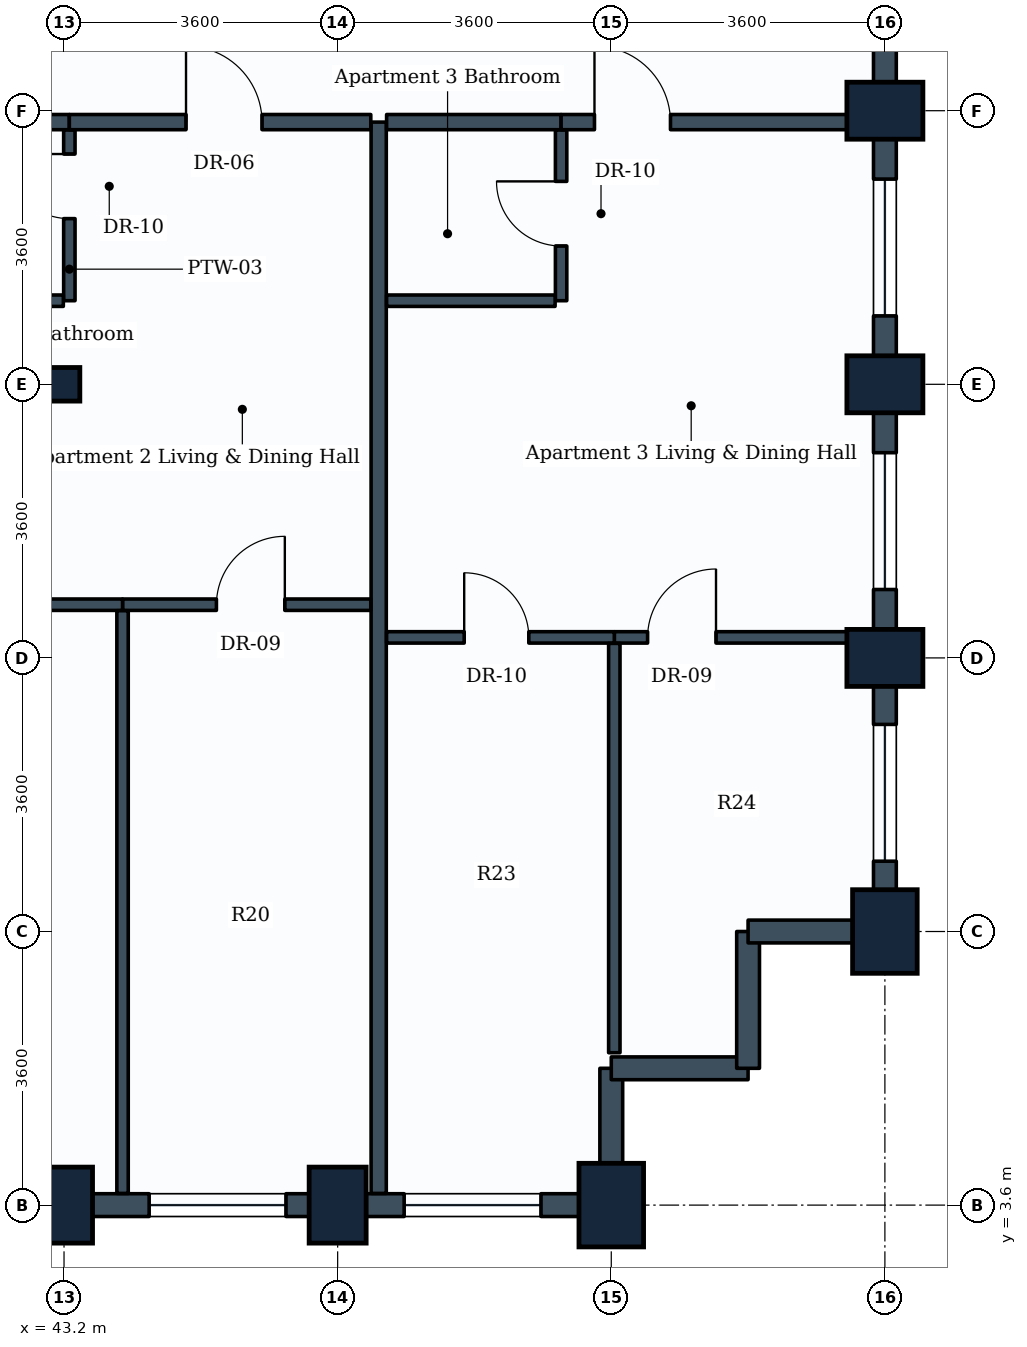
"""IFC4 building model, lengths in metres.
Left out: names, types, materials, properties, quantities, classifications, styles, units other than length and angle.
Written with IfcOpenShell. Run it as: python <this file> out.ifc"""

import sys

from ifc_helpers import new_model, si_unit, direction, frame, frame_2d, origin, origin_2d, place, context, subcontext, project, spatial, rectangle, i_section, extrude, element, fill, save


model = new_model("IFC4")
c1 = context("Model", 3, precision=1e-05, world=origin(), true_north=direction((0.0, 1.0)))
c2 = subcontext(c1, "Body", "Model", "MODEL_VIEW")
j1 = project(units=[si_unit("LENGTHUNIT", "METRE"), si_unit("PLANEANGLEUNIT", "RADIAN")], contexts=[c1])
p1 = place(None, origin())
s1 = spatial("IfcSite", under=j1, at=p1, CompositionType="ELEMENT")
p2 = place(p1, origin())
s2 = spatial("IfcBuilding", under=s1, at=p2, CompositionType="ELEMENT")
p3 = place(p2, frame((0.0, 0.0, 142.8)))
s3 = spatial("IfcBuildingStorey", under=s2, at=p3, CompositionType="ELEMENT", Elevation=142.8)
p4 = place(p3, frame((43.2, 3.6, 0.0), z_axis=(0.0, 0.0, 1.0), x_axis=(1.0, 0.0, 0.0)))
e1 = element("IfcColumn", 1, at=p4, inside=s3, PredefinedType="COLUMN", context=c2, shape_type="SweptSolid", body=[
    extrude(rectangle(XDim=0.75, YDim=1.0, at=origin_2d()), origin(), (0.0, 0.0, 1.0), 3.8),
])
p5 = place(p3, frame((43.2, 14.4, 0.0), z_axis=(0.0, 0.0, 1.0), x_axis=(1.0, 0.0, 0.0)))
e2 = element("IfcColumn", 2, at=p5, inside=s3, PredefinedType="COLUMN", context=c2, shape_type="SweptSolid", body=[
    extrude(i_section(OverallWidth=0.416, OverallDepth=0.442, WebThickness=0.025, FlangeThickness=0.041, FilletRadius=0.015, at=origin_2d()), origin(), (0.0, 0.0, 1.0), 3.8),
])
p6 = place(p3, frame((46.8, 3.6, 0.0), z_axis=(0.0, 0.0, 1.0), x_axis=(1.0, 0.0, 0.0)))
e3 = element("IfcColumn", 3, at=p6, inside=s3, PredefinedType="COLUMN", context=c2, shape_type="SweptSolid", body=[
    extrude(rectangle(XDim=0.75, YDim=1.0, at=origin_2d()), origin(), (0.0, 0.0, 1.0), 3.8),
])
for number, where, z_axis, x_axis in (
    (4, (50.4, 3.6, 0.0), (0.0, 0.0, 1.0), (1.0, 0.0, 0.0)),
    (5, (54.0, 7.2, 0.0), (0.0, 0.0, 1.0), (1.0, 0.0, 0.0)),
):
    element("IfcColumn", number, at=place(p3, frame(where, z_axis=z_axis, x_axis=x_axis)), inside=s3, PredefinedType="COLUMN", context=c2, shape_type="SweptSolid", body=[
        extrude(rectangle(XDim=0.85, YDim=1.1, at=origin_2d()), origin(), (0.0, 0.0, 1.0), 3.8),
    ])
for number, where, z_axis, x_axis in (
    (6, (54.0, 10.8, 0.0), (0.0, 0.0, 1.0), (0.0, 1.0, 0.0)),
    (7, (54.0, 14.4, 0.0), (0.0, 0.0, 1.0), (0.0, 1.0, 0.0)),
    (8, (54.0, 18.0, 0.0), (0.0, 0.0, 1.0), (0.0, 1.0, 0.0)),
):
    element("IfcColumn", number, at=place(p3, frame(where, z_axis=z_axis, x_axis=x_axis)), inside=s3, PredefinedType="COLUMN", context=c2, shape_type="SweptSolid", body=[
        extrude(rectangle(XDim=0.75, YDim=1.0, at=origin_2d()), origin(), (0.0, 0.0, 1.0), 3.8),
    ])
p7 = place(p3, frame((43.2, 3.6, 0.0), z_axis=(0.0, 0.0, 1.0), x_axis=(-1.0, 0.0, 0.0)))
e9 = element("IfcWall", 9, at=p7, inside=s3, PredefinedType="STANDARD", context=c2, shape_type="SweptSolid", body=[
    extrude(rectangle(XDim=3.6, YDim=0.3, at=frame_2d((1.8, 0.0))), origin(), (0.0, 0.0, 1.0), 2.93),
])
p8 = place(p3, frame((46.8, 3.6, 0.0), z_axis=(0.0, 0.0, 1.0), x_axis=(-1.0, 0.0, 0.0)))
e10 = element("IfcWall", 10, at=p8, inside=s3, PredefinedType="STANDARD", context=c2, shape_type="SweptSolid", body=[
    extrude(rectangle(XDim=3.6, YDim=0.3, at=frame_2d((1.8, 0.0))), origin(), (0.0, 0.0, 1.0), 2.93),
])
p9 = place(p8, frame((0.68, 0.0, 0.85)))
e11 = element("IfcOpeningElement", 11, at=p9, cuts=e10, PredefinedType="OPENING", context=c2, shape_type="SweptSolid", body=[
    extrude(rectangle(XDim=1.8, YDim=1.35, at=frame_2d((0.9, 0.675))), frame((0.0, 0.16, 0.0), z_axis=(0.0, -1.0, 0.0), x_axis=(1.0, 0.0, 0.0)), (0.0, 0.0, 1.0), 0.32),
])
p10 = place(p3, frame((50.4, 3.6, 0.0), z_axis=(0.0, 0.0, 1.0), x_axis=(-1.0, 0.0, 0.0)))
e12 = element("IfcWall", 12, at=p10, inside=s3, PredefinedType="STANDARD", context=c2, shape_type="SweptSolid", body=[
    extrude(rectangle(XDim=3.6, YDim=0.3, at=frame_2d((1.8, 0.0))), origin(), (0.0, 0.0, 1.0), 2.93),
])
p11 = place(p10, frame((0.925, 0.0, 0.85)))
e13 = element("IfcOpeningElement", 13, at=p11, cuts=e12, PredefinedType="OPENING", context=c2, shape_type="SweptSolid", body=[
    extrude(rectangle(XDim=1.8, YDim=1.35, at=frame_2d((0.9, 0.675))), frame((0.0, 0.16, 0.0), z_axis=(0.0, -1.0, 0.0), x_axis=(1.0, 0.0, 0.0)), (0.0, 0.0, 1.0), 0.32),
])
p12 = place(p3, frame((50.4, 5.4, 0.0), z_axis=(0.0, 0.0, 1.0), x_axis=(0.0, -1.0, 0.0)))
e14 = element("IfcWall", 14, at=p12, inside=s3, PredefinedType="STANDARD", context=c2, shape_type="SweptSolid", body=[
    extrude(rectangle(XDim=1.8, YDim=0.3, at=frame_2d((0.9, 0.0))), origin(), (0.0, 0.0, 1.0), 2.93),
])
for number, where, z_axis, x_axis in (
    (15, (52.2, 5.4, 0.0), (0.0, 0.0, 1.0), (-1.0, 0.0, 0.0)),
    (16, (52.2, 7.2, 0.0), (0.0, 0.0, 1.0), (0.0, -1.0, 0.0)),
):
    element("IfcWall", number, at=place(p3, frame(where, z_axis=z_axis, x_axis=x_axis)), inside=s3, PredefinedType="STANDARD", context=c2, shape_type="SweptSolid", body=[
        extrude(rectangle(XDim=1.8, YDim=0.3, at=frame_2d((0.9, 0.0))), origin(), (0.0, 0.0, 1.0), 3.535),
    ])
p13 = place(p3, frame((54.0, 7.2, 0.0), z_axis=(0.0, 0.0, 1.0), x_axis=(-1.0, 0.0, 0.0)))
e17 = element("IfcWall", 17, at=p13, inside=s3, PredefinedType="STANDARD", context=c2, shape_type="SweptSolid", body=[
    extrude(rectangle(XDim=1.8, YDim=0.3, at=frame_2d((0.9, 0.0))), origin(), (0.0, 0.0, 1.0), 2.93),
])
p14 = place(p3, frame((54.0, 10.8, 0.0), z_axis=(0.0, 0.0, 1.0), x_axis=(0.0, -1.0, 0.0)))
e18 = element("IfcWall", 18, at=p14, inside=s3, PredefinedType="STANDARD", context=c2, shape_type="SweptSolid", body=[
    extrude(rectangle(XDim=3.6, YDim=0.3, at=frame_2d((1.8, 0.0))), origin(), (0.0, 0.0, 1.0), 2.93),
])
p15 = place(p14, frame((0.875, 0.0, 0.85)))
e19 = element("IfcOpeningElement", 19, at=p15, cuts=e18, PredefinedType="OPENING", context=c2, shape_type="SweptSolid", body=[
    extrude(rectangle(XDim=1.8, YDim=1.35, at=frame_2d((0.9, 0.675))), frame((0.0, 0.16, 0.0), z_axis=(0.0, -1.0, 0.0), x_axis=(1.0, 0.0, 0.0)), (0.0, 0.0, 1.0), 0.32),
])
p16 = place(p3, frame((54.0, 14.4, 0.0), z_axis=(0.0, 0.0, 1.0), x_axis=(0.0, -1.0, 0.0)))
e20 = element("IfcWall", 20, at=p16, inside=s3, PredefinedType="STANDARD", context=c2, shape_type="SweptSolid", body=[
    extrude(rectangle(XDim=3.6, YDim=0.3, at=frame_2d((1.8, 0.0))), origin(), (0.0, 0.0, 1.0), 2.93),
])
p17 = place(p16, frame((0.9, 0.0, 0.85)))
e21 = element("IfcOpeningElement", 21, at=p17, cuts=e20, PredefinedType="OPENING", context=c2, shape_type="SweptSolid", body=[
    extrude(rectangle(XDim=1.8, YDim=1.35, at=frame_2d((0.9, 0.675))), frame((0.0, 0.16, 0.0), z_axis=(0.0, -1.0, 0.0), x_axis=(1.0, 0.0, 0.0)), (0.0, 0.0, 1.0), 0.32),
])
p18 = place(p3, frame((54.0, 18.0, 0.0), z_axis=(0.0, 0.0, 1.0), x_axis=(0.0, -1.0, 0.0)))
e22 = element("IfcWall", 22, at=p18, inside=s3, PredefinedType="STANDARD", context=c2, shape_type="SweptSolid", body=[
    extrude(rectangle(XDim=3.6, YDim=0.3, at=frame_2d((1.8, 0.0))), origin(), (0.0, 0.0, 1.0), 2.93),
])
p19 = place(p18, frame((0.9, 0.0, 0.85)))
e23 = element("IfcOpeningElement", 23, at=p19, cuts=e22, PredefinedType="OPENING", context=c2, shape_type="SweptSolid", body=[
    extrude(rectangle(XDim=1.8, YDim=1.35, at=frame_2d((0.9, 0.675))), frame((0.0, 0.16, 0.0), z_axis=(0.0, -1.0, 0.0), x_axis=(1.0, 0.0, 0.0)), (0.0, 0.0, 1.0), 0.32),
])
p20 = place(p3, frame((54.0, 21.6, 0.0), z_axis=(0.0, 0.0, 1.0), x_axis=(0.0, -1.0, 0.0)))
e24 = element("IfcWall", 24, at=p20, inside=s3, PredefinedType="STANDARD", context=c2, shape_type="SweptSolid", body=[
    extrude(rectangle(XDim=3.6, YDim=0.3, at=frame_2d((1.8, 0.0))), origin(), (0.0, 0.0, 1.0), 2.93),
])
p21 = place(p3, frame((47.34, 3.754, 0.0), z_axis=(0.0, 0.0, 1.0), x_axis=(0.0, 1.0, 0.0)))
e25 = element("IfcWall", 25, at=p21, inside=s3, PredefinedType="PARTITIONING", context=c2, shape_type="SweptSolid", body=[
    extrude(rectangle(XDim=14.096, YDim=0.2, at=frame_2d((7.048, 0.0))), origin(), (0.0, 0.0, 1.0), 2.93),
])
p22 = place(p3, frame((40.974, 17.85, 0.0), z_axis=(0.0, 0.0, 1.0), x_axis=(1.0, 0.0, 0.0)))
e26 = element("IfcWall", 26, at=p22, inside=s3, PredefinedType="PARTITIONING", context=c2, shape_type="SweptSolid", body=[
    extrude(rectangle(XDim=2.296, YDim=0.2, at=frame_2d((1.148, 0.0))), origin(), (0.0, 0.0, 1.0), 3.13),
])
p23 = place(p3, frame((43.27, 15.5, 0.0), z_axis=(0.0, 0.0, 1.0), x_axis=(0.0, 1.0, 0.0)))
e27 = element("IfcWall", 27, at=p23, inside=s3, PredefinedType="PARTITIONING", context=c2, shape_type="SweptSolid", body=[
    extrude(rectangle(XDim=2.246, YDim=0.15, at=frame_2d((1.123, 0.0))), origin(), (0.0, 0.0, 1.0), 3.18),
])
p24 = place(p23, frame((1.08, 0.0, 0.0)))
e28 = element("IfcOpeningElement", 28, at=p24, cuts=e27, PredefinedType="OPENING", context=c2, shape_type="SweptSolid", body=[
    extrude(rectangle(XDim=0.85, YDim=2.1, at=frame_2d((0.425, 1.05))), frame((0.0, 0.085, 0.0), z_axis=(0.0, -1.0, 0.0), x_axis=(1.0, 0.0, 0.0)), (0.0, 0.0, 1.0), 0.17),
])
p25 = place(p3, frame((40.974, 15.5, 0.0), z_axis=(0.0, 0.0, 1.0), x_axis=(1.0, 0.0, 0.0)))
e29 = element("IfcWall", 29, at=p25, inside=s3, PredefinedType="PARTITIONING", context=c2, shape_type="SweptSolid", body=[
    extrude(rectangle(XDim=2.217, YDim=0.15, at=frame_2d((1.108, 0.0))), origin(), (0.0, 0.0, 1.0), 3.18),
])
p26 = place(p3, frame((43.27, 17.85, 0.0), z_axis=(0.0, 0.0, 1.0), x_axis=(1.0, 0.0, 0.0)))
e30 = element("IfcWall", 30, at=p26, inside=s3, PredefinedType="PARTITIONING", context=c2, shape_type="SweptSolid", body=[
    extrude(rectangle(XDim=3.966, YDim=0.2, at=frame_2d((1.983, 0.0))), origin(), (0.0, 0.0, 1.0), 3.17),
])
p27 = place(p26, frame((1.535, 0.0, 0.0)))
e31 = element("IfcOpeningElement", 31, at=p27, cuts=e30, PredefinedType="OPENING", context=c2, shape_type="SweptSolid", body=[
    extrude(rectangle(XDim=1.0, YDim=2.1, at=frame_2d((0.5, 1.05))), frame((0.0, 0.11, 0.0), z_axis=(0.0, -1.0, 0.0), x_axis=(1.0, 0.0, 0.0)), (0.0, 0.0, 1.0), 0.22),
])
p28 = place(p3, frame((43.97, 11.5, 0.0), z_axis=(0.0, 0.0, 1.0), x_axis=(1.0, 0.0, 0.0)))
e32 = element("IfcWall", 32, at=p28, inside=s3, PredefinedType="PARTITIONING", context=c2, shape_type="SweptSolid", body=[
    extrude(rectangle(XDim=3.266, YDim=0.15, at=frame_2d((1.633, 0.0))), origin(), (0.0, 0.0, 1.0), 3.17),
])
p29 = place(p28, frame((1.235, 0.0, 0.0)))
e33 = element("IfcOpeningElement", 33, at=p29, cuts=e32, PredefinedType="OPENING", context=c2, shape_type="SweptSolid", body=[
    extrude(rectangle(XDim=0.9, YDim=2.1, at=frame_2d((0.45, 1.05))), frame((0.0, 0.085, 0.0), z_axis=(0.0, -1.0, 0.0), x_axis=(1.0, 0.0, 0.0)), (0.0, 0.0, 1.0), 0.17),
])
p30 = place(p3, frame((40.974, 11.5, 0.0), z_axis=(0.0, 0.0, 1.0), x_axis=(1.0, 0.0, 0.0)))
e34 = element("IfcWall", 34, at=p30, inside=s3, PredefinedType="PARTITIONING", context=c2, shape_type="SweptSolid", body=[
    extrude(rectangle(XDim=2.996, YDim=0.15, at=frame_2d((1.498, 0.0))), origin(), (0.0, 0.0, 1.0), 3.18),
])
p31 = place(p30, frame((0.333, 0.0, 0.0)))
e35 = element("IfcOpeningElement", 35, at=p31, cuts=e34, PredefinedType="OPENING", context=c2, shape_type="SweptSolid", body=[
    extrude(rectangle(XDim=0.85, YDim=2.1, at=frame_2d((0.425, 1.05))), frame((0.0, 0.085, 0.0), z_axis=(0.0, -1.0, 0.0), x_axis=(1.0, 0.0, 0.0)), (0.0, 0.0, 1.0), 0.17),
])
p32 = place(p3, frame((43.97, 3.754, 0.0), z_axis=(0.0, 0.0, 1.0), x_axis=(0.0, 1.0, 0.0)))
e36 = element("IfcWall", 36, at=p32, inside=s3, PredefinedType="PARTITIONING", context=c2, shape_type="SweptSolid", body=[
    extrude(rectangle(XDim=7.667, YDim=0.15, at=frame_2d((3.833, 0.0))), origin(), (0.0, 0.0, 1.0), 2.93),
])
p33 = place(p3, frame((47.444, 17.85, 0.0), z_axis=(0.0, 0.0, 1.0), x_axis=(1.0, 0.0, 0.0)))
e37 = element("IfcWall", 37, at=p33, inside=s3, PredefinedType="PARTITIONING", context=c2, shape_type="SweptSolid", body=[
    extrude(rectangle(XDim=2.296, YDim=0.2, at=frame_2d((1.148, 0.0))), origin(), (0.0, 0.0, 1.0), 3.535),
])
p34 = place(p3, frame((49.74, 15.5, 0.0), z_axis=(0.0, 0.0, 1.0), x_axis=(0.0, 1.0, 0.0)))
e38 = element("IfcWall", 38, at=p34, inside=s3, PredefinedType="PARTITIONING", context=c2, shape_type="SweptSolid", body=[
    extrude(rectangle(XDim=2.246, YDim=0.15, at=frame_2d((1.123, 0.0))), origin(), (0.0, 0.0, 1.0), 3.535),
])
p35 = place(p34, frame((0.72, 0.0, 0.0)))
e39 = element("IfcOpeningElement", 39, at=p35, cuts=e38, PredefinedType="OPENING", context=c2, shape_type="SweptSolid", body=[
    extrude(rectangle(XDim=0.85, YDim=2.1, at=frame_2d((0.425, 1.05))), frame((0.0, 0.085, 0.0), z_axis=(0.0, -1.0, 0.0), x_axis=(1.0, 0.0, 0.0)), (0.0, 0.0, 1.0), 0.17),
])
p36 = place(p3, frame((47.444, 15.5, 0.0), z_axis=(0.0, 0.0, 1.0), x_axis=(1.0, 0.0, 0.0)))
e40 = element("IfcWall", 40, at=p36, inside=s3, PredefinedType="PARTITIONING", context=c2, shape_type="SweptSolid", body=[
    extrude(rectangle(XDim=2.217, YDim=0.15, at=frame_2d((1.108, 0.0))), origin(), (0.0, 0.0, 1.0), 3.535),
])
p37 = place(p3, frame((49.74, 17.85, 0.0), z_axis=(0.0, 0.0, 1.0), x_axis=(1.0, 0.0, 0.0)))
e41 = element("IfcWall", 41, at=p37, inside=s3, PredefinedType="PARTITIONING", context=c2, shape_type="SweptSolid", body=[
    extrude(rectangle(XDim=4.106, YDim=0.2, at=frame_2d((2.053, 0.0))), origin(), (0.0, 0.0, 1.0), 2.93),
])
p38 = place(p37, frame((0.439, 0.0, 0.0)))
e42 = element("IfcOpeningElement", 42, at=p38, cuts=e41, PredefinedType="OPENING", context=c2, shape_type="SweptSolid", body=[
    extrude(rectangle(XDim=1.0, YDim=2.1, at=frame_2d((0.5, 1.05))), frame((0.0, 0.11, 0.0), z_axis=(0.0, -1.0, 0.0), x_axis=(1.0, 0.0, 0.0)), (0.0, 0.0, 1.0), 0.22),
])
p39 = place(p3, frame((50.44, 11.07, 0.0), z_axis=(0.0, 0.0, 1.0), x_axis=(1.0, 0.0, 0.0)))
e43 = element("IfcWall", 43, at=p39, inside=s3, PredefinedType="PARTITIONING", context=c2, shape_type="SweptSolid", body=[
    extrude(rectangle(XDim=3.406, YDim=0.15, at=frame_2d((1.703, 0.0))), origin(), (0.0, 0.0, 1.0), 2.93),
])
p40 = place(p39, frame((0.438, 0.0, 0.0)))
e44 = element("IfcOpeningElement", 44, at=p40, cuts=e43, PredefinedType="OPENING", context=c2, shape_type="SweptSolid", body=[
    extrude(rectangle(XDim=0.9, YDim=2.1, at=frame_2d((0.45, 1.05))), frame((0.0, 0.085, 0.0), z_axis=(0.0, -1.0, 0.0), x_axis=(1.0, 0.0, 0.0)), (0.0, 0.0, 1.0), 0.17),
])
p41 = place(p3, frame((47.444, 11.07, 0.0), z_axis=(0.0, 0.0, 1.0), x_axis=(1.0, 0.0, 0.0)))
e45 = element("IfcWall", 45, at=p41, inside=s3, PredefinedType="PARTITIONING", context=c2, shape_type="SweptSolid", body=[
    extrude(rectangle(XDim=2.996, YDim=0.15, at=frame_2d((1.498, 0.0))), origin(), (0.0, 0.0, 1.0), 3.535),
])
p42 = place(p41, frame((1.021, 0.0, 0.0)))
e46 = element("IfcOpeningElement", 46, at=p42, cuts=e45, PredefinedType="OPENING", context=c2, shape_type="SweptSolid", body=[
    extrude(rectangle(XDim=0.85, YDim=2.1, at=frame_2d((0.425, 1.05))), frame((0.0, 0.085, 0.0), z_axis=(0.0, -1.0, 0.0), x_axis=(1.0, 0.0, 0.0)), (0.0, 0.0, 1.0), 0.17),
])
p43 = place(p3, frame((50.44, 5.605, 0.0), z_axis=(0.0, 0.0, 1.0), x_axis=(0.0, 1.0, 0.0)))
e47 = element("IfcWall", 47, at=p43, inside=s3, PredefinedType="PARTITIONING", context=c2, shape_type="SweptSolid", body=[
    extrude(rectangle(XDim=5.386, YDim=0.15, at=frame_2d((2.693, 0.0))), origin(), (0.0, 0.0, 1.0), 3.535),
])
p44 = place(p9, origin())
e48 = element("IfcWindow", 48, at=p44, inside=s3, PartitioningType="SINGLE_PANEL", PredefinedType="WINDOW", context=c2, shape_type="SweptSolid", body=[
    extrude(rectangle(XDim=1.8, YDim=1.35, at=frame_2d((0.9, 0.675))), frame((0.0, 0.03, 0.0), z_axis=(0.0, -1.0, 0.0), x_axis=(1.0, 0.0, 0.0)), (0.0, 0.0, 1.0), 0.06),
])
fill(e11, e48)
p45 = place(p11, origin())
e49 = element("IfcWindow", 49, at=p45, inside=s3, PartitioningType="SINGLE_PANEL", PredefinedType="WINDOW", context=c2, shape_type="SweptSolid", body=[
    extrude(rectangle(XDim=1.8, YDim=1.35, at=frame_2d((0.9, 0.675))), frame((0.0, 0.03, 0.0), z_axis=(0.0, -1.0, 0.0), x_axis=(1.0, 0.0, 0.0)), (0.0, 0.0, 1.0), 0.06),
])
fill(e13, e49)
p46 = place(p15, origin())
e50 = element("IfcWindow", 50, at=p46, inside=s3, PartitioningType="SINGLE_PANEL", PredefinedType="WINDOW", context=c2, shape_type="SweptSolid", body=[
    extrude(rectangle(XDim=1.8, YDim=1.35, at=frame_2d((0.9, 0.675))), frame((0.0, 0.03, 0.0), z_axis=(0.0, -1.0, 0.0), x_axis=(1.0, 0.0, 0.0)), (0.0, 0.0, 1.0), 0.06),
])
fill(e19, e50)
p47 = place(p17, origin())
e51 = element("IfcWindow", 51, at=p47, inside=s3, PartitioningType="SINGLE_PANEL", PredefinedType="WINDOW", context=c2, shape_type="SweptSolid", body=[
    extrude(rectangle(XDim=1.8, YDim=1.35, at=frame_2d((0.9, 0.675))), frame((0.0, 0.03, 0.0), z_axis=(0.0, -1.0, 0.0), x_axis=(1.0, 0.0, 0.0)), (0.0, 0.0, 1.0), 0.06),
])
fill(e21, e51)
p48 = place(p19, origin())
e52 = element("IfcWindow", 52, at=p48, inside=s3, PartitioningType="SINGLE_PANEL", PredefinedType="WINDOW", context=c2, shape_type="SweptSolid", body=[
    extrude(rectangle(XDim=1.8, YDim=1.35, at=frame_2d((0.9, 0.675))), frame((0.0, 0.03, 0.0), z_axis=(0.0, -1.0, 0.0), x_axis=(1.0, 0.0, 0.0)), (0.0, 0.0, 1.0), 0.06),
])
fill(e23, e52)
p49 = place(p24, origin())
e53 = element("IfcDoor", 53, at=p49, inside=s3, OperationType="SINGLE_SWING_RIGHT", PredefinedType="DOOR", context=c2, shape_type="SweptSolid", body=[
    extrude(rectangle(XDim=0.85, YDim=2.1, at=frame_2d((0.425, 1.05))), frame((0.0, 0.025, 0.0), z_axis=(0.0, -1.0, 0.0), x_axis=(1.0, 0.0, 0.0)), (0.0, 0.0, 1.0), 0.05),
])
fill(e28, e53)
p50 = place(p27, origin())
e54 = element("IfcDoor", 54, at=p50, inside=s3, OperationType="SINGLE_SWING_LEFT", PredefinedType="DOOR", context=c2, shape_type="SweptSolid", body=[
    extrude(rectangle(XDim=1.0, YDim=2.1, at=frame_2d((0.5, 1.05))), frame((0.0, 0.025, 0.0), z_axis=(0.0, -1.0, 0.0), x_axis=(1.0, 0.0, 0.0)), (0.0, 0.0, 1.0), 0.05),
])
fill(e31, e54)
p51 = place(p29, origin())
e55 = element("IfcDoor", 55, at=p51, inside=s3, OperationType="SINGLE_SWING_RIGHT", PredefinedType="DOOR", context=c2, shape_type="SweptSolid", body=[
    extrude(rectangle(XDim=0.9, YDim=2.1, at=frame_2d((0.45, 1.05))), frame((0.0, 0.025, 0.0), z_axis=(0.0, -1.0, 0.0), x_axis=(1.0, 0.0, 0.0)), (0.0, 0.0, 1.0), 0.05),
])
fill(e33, e55)
p52 = place(p35, origin())
e56 = element("IfcDoor", 56, at=p52, inside=s3, OperationType="SINGLE_SWING_RIGHT", PredefinedType="DOOR", context=c2, shape_type="SweptSolid", body=[
    extrude(rectangle(XDim=0.85, YDim=2.1, at=frame_2d((0.425, 1.05))), frame((0.0, 0.025, 0.0), z_axis=(0.0, -1.0, 0.0), x_axis=(1.0, 0.0, 0.0)), (0.0, 0.0, 1.0), 0.05),
])
fill(e39, e56)
p53 = place(p38, origin())
e57 = element("IfcDoor", 57, at=p53, inside=s3, OperationType="SINGLE_SWING_LEFT", PredefinedType="DOOR", context=c2, shape_type="SweptSolid", body=[
    extrude(rectangle(XDim=1.0, YDim=2.1, at=frame_2d((0.5, 1.05))), frame((0.0, 0.025, 0.0), z_axis=(0.0, -1.0, 0.0), x_axis=(1.0, 0.0, 0.0)), (0.0, 0.0, 1.0), 0.05),
])
fill(e42, e57)
p54 = place(p40, origin())
e58 = element("IfcDoor", 58, at=p54, inside=s3, OperationType="SINGLE_SWING_RIGHT", PredefinedType="DOOR", context=c2, shape_type="SweptSolid", body=[
    extrude(rectangle(XDim=0.9, YDim=2.1, at=frame_2d((0.45, 1.05))), frame((0.0, 0.025, 0.0), z_axis=(0.0, -1.0, 0.0), x_axis=(1.0, 0.0, 0.0)), (0.0, 0.0, 1.0), 0.05),
])
fill(e44, e58)
p55 = place(p42, origin())
e59 = element("IfcDoor", 59, at=p55, inside=s3, OperationType="SINGLE_SWING_LEFT", PredefinedType="DOOR", context=c2, shape_type="SweptSolid", body=[
    extrude(rectangle(XDim=0.85, YDim=2.1, at=frame_2d((0.425, 1.05))), frame((0.0, 0.025, 0.0), z_axis=(0.0, -1.0, 0.0), x_axis=(1.0, 0.0, 0.0)), (0.0, 0.0, 1.0), 0.05),
])
fill(e46, e59)
save(model, sys.argv[1])
